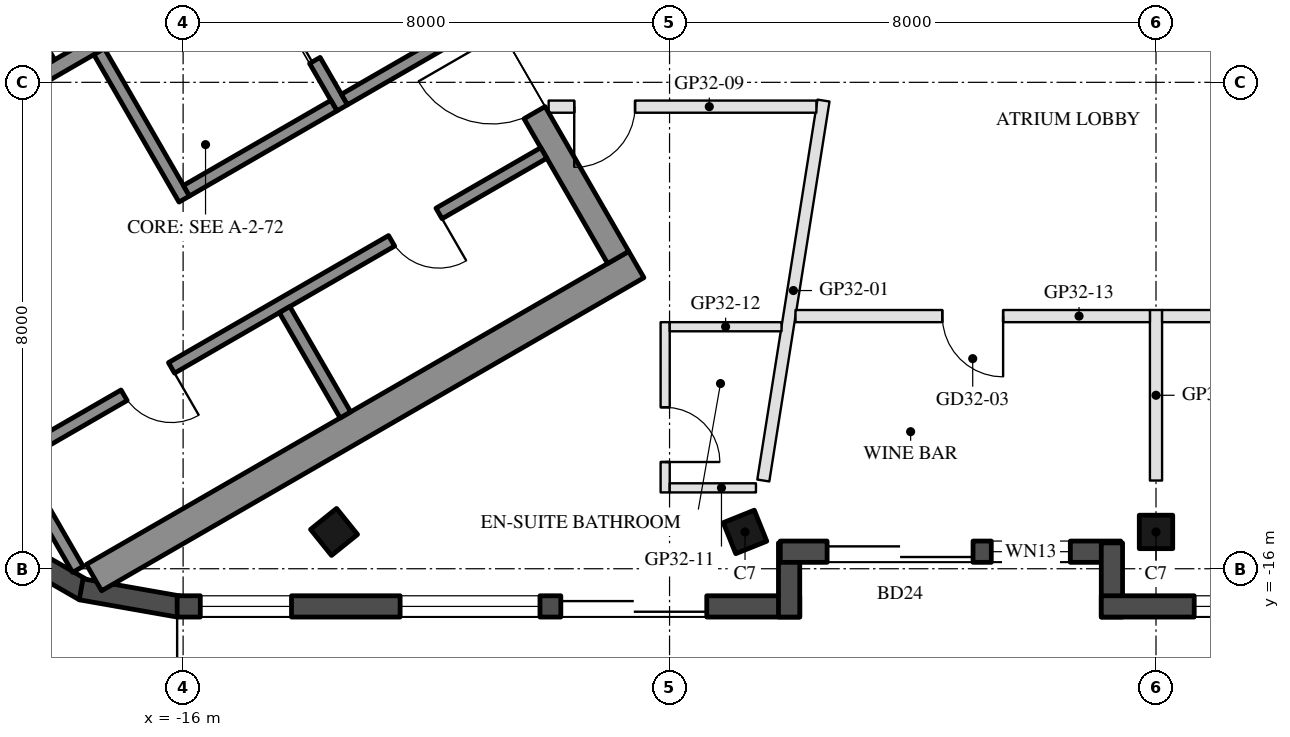
"""IFC4 building model, lengths in metres.
Left out: names, types, materials, properties, quantities, classifications, styles, units other than length and angle.
Written with IfcOpenShell. Run it as: python <this file> out.ifc"""

import sys

from ifc_helpers import new_model, si_unit, direction, frame, frame_2d, origin, origin_2d, place, context, subcontext, project, spatial, rectangle, hollow_rectangle, extrude, boolean, halfspace, element, fill, save


model = new_model("IFC4")
c1 = context("Model", 3, precision=1e-05, world=origin(), true_north=direction((0.0, 1.0)))
c2 = subcontext(c1, "Body", "Model", "MODEL_VIEW")
j1 = project(units=[si_unit("LENGTHUNIT", "METRE"), si_unit("PLANEANGLEUNIT", "RADIAN")], contexts=[c1])
p1 = place(None, origin())
s1 = spatial("IfcSite", under=j1, at=p1, CompositionType="ELEMENT")
p2 = place(p1, origin())
s2 = spatial("IfcBuilding", under=s1, at=p2, CompositionType="ELEMENT")
p3 = place(p2, frame((0.0, 0.0, 309.6)))
s3 = spatial("IfcBuildingStorey", under=s2, at=p3, CompositionType="ELEMENT", Elevation=309.6)
p4 = place(p3, frame((-13.518, -15.395, 0.0), z_axis=(0.121069901949, 0.150398600122, 0.981184151892), x_axis=(-0.992601568988, 0.00920533993, 0.121067695767)))
e1 = element("IfcColumn", 1, at=p4, inside=s3, PredefinedType="COLUMN", context=c2, shape_type="SweptSolid", body=[
    boolean("DIFFERENCE", boolean("DIFFERENCE", extrude(hollow_rectangle(XDim=0.55, YDim=0.55, WallThickness=0.025, at=origin_2d()), origin(), (0.0, 0.0, 1.0), 3.771), halfspace(frame((0.0, 0.0, 0.04), z_axis=(0.0, 0.0, 1.0), x_axis=(1.0, 0.0, 0.0)), True)), halfspace(frame((0.0, 0.0, 3.731), z_axis=(0.0, 0.0, 1.0), x_axis=(1.0, 0.0, 0.0)), False)),
])
p5 = place(p3, frame((-6.759, -15.395, 0.0), z_axis=(0.060805602285, 0.151232777417, 0.986626234075), x_axis=(-0.998137511125, 0.004342411053, 0.060849423591)))
e2 = element("IfcColumn", 2, at=p5, inside=s3, PredefinedType="COLUMN", context=c2, shape_type="SweptSolid", body=[
    boolean("DIFFERENCE", boolean("DIFFERENCE", extrude(hollow_rectangle(XDim=0.55, YDim=0.55, WallThickness=0.025, at=origin_2d()), origin(), (0.0, 0.0, 1.0), 3.75), halfspace(frame((0.0, 0.0, 0.034), z_axis=(0.0, 0.0, 1.0), x_axis=(1.0, 0.0, 0.0)), True)), halfspace(frame((0.0, 0.0, 3.716), z_axis=(0.0, 0.0, 1.0), x_axis=(1.0, 0.0, 0.0)), False)),
])
p6 = place(p3, frame((0.0, -15.395, 0.0), z_axis=(0.0, 0.151513133163, 0.98845524455), x_axis=(-1.0, 0.0, 0.0)))
e3 = element("IfcColumn", 3, at=p6, inside=s3, PredefinedType="COLUMN", context=c2, shape_type="SweptSolid", body=[
    boolean("DIFFERENCE", boolean("DIFFERENCE", extrude(hollow_rectangle(XDim=0.55, YDim=0.55, WallThickness=0.025, at=origin_2d()), origin(), (0.0, 0.0, 1.0), 3.743), halfspace(frame((0.0, 0.0, 0.031), z_axis=(0.0, 0.0, 1.0), x_axis=(1.0, 0.0, 0.0)), True)), halfspace(frame((0.0, 0.0, 3.712), z_axis=(0.0, 0.0, 1.0), x_axis=(1.0, 0.0, 0.0)), False)),
])
p7 = place(p3, frame((-19.035, -15.542, 0.0), z_axis=(0.0, 0.0, 1.0), x_axis=(0.866083589932, -0.499899205091, 0.0)))
e4 = element("IfcWall", 4, at=p7, inside=s3, PredefinedType="SOLIDWALL", context=c2, shape_type="SweptSolid", body=[
    extrude(rectangle(XDim=1.634, YDim=0.35, at=frame_2d((0.817, 0.0))), origin(), (0.0, 0.0, 1.0), 3.55),
])
p8 = place(p3, frame((-17.677, -16.338, 0.0), z_axis=(0.0, 0.0, 1.0), x_axis=(0.98479107762, -0.173742721977, 0.0)))
e5 = element("IfcWall", 5, at=p8, inside=s3, PredefinedType="SOLIDWALL", context=c2, shape_type="SweptSolid", body=[
    extrude(rectangle(XDim=1.634, YDim=0.35, at=frame_2d((0.817, 0.0))), origin(), (0.0, 0.0, 1.0), 3.55),
])
p9 = place(p3, frame((-16.098, -16.62, 0.0), z_axis=(0.0, 0.0, 1.0), x_axis=(1.0, 0.0, 0.0)))
e6 = element("IfcWall", 6, at=p9, inside=s3, PredefinedType="SOLIDWALL", context=c2, shape_type="SweptSolid", body=[
    extrude(rectangle(XDim=10.239, YDim=0.35, at=frame_2d((5.12, 0.0))), origin(), (0.0, 0.0, 1.0), 3.55),
])
p10 = place(p9, frame((0.381, 0.0, 0.3)))
e7 = element("IfcOpeningElement", 7, at=p10, cuts=e6, PredefinedType="OPENING", context=c2, shape_type="SweptSolid", body=[
    extrude(rectangle(XDim=1.5, YDim=2.65, at=frame_2d((0.75, 1.325))), frame((0.0, 0.185, 0.0), z_axis=(0.0, -1.0, 0.0), x_axis=(1.0, 0.0, 0.0)), (0.0, 0.0, 1.0), 0.37),
])
p11 = place(p9, frame((6.31, 0.0, 0.0)))
e8 = element("IfcOpeningElement", 8, at=p11, cuts=e6, PredefinedType="OPENING", context=c2, shape_type="SweptSolid", body=[
    extrude(rectangle(XDim=2.4, YDim=2.4, at=frame_2d((1.2, 1.2))), frame((0.0, 0.185, 0.0), z_axis=(0.0, -1.0, 0.0), x_axis=(1.0, 0.0, 0.0)), (0.0, 0.0, 1.0), 0.37),
])
p12 = place(p9, frame((3.667, 0.0, 0.3)))
e9 = element("IfcOpeningElement", 9, at=p12, cuts=e6, PredefinedType="OPENING", context=c2, shape_type="SweptSolid", body=[
    extrude(rectangle(XDim=2.3, YDim=2.65, at=frame_2d((1.15, 1.325))), frame((0.0, 0.185, 0.0), z_axis=(0.0, -1.0, 0.0), x_axis=(1.0, 0.0, 0.0)), (0.0, 0.0, 1.0), 0.37),
])
p13 = place(p3, frame((-6.034, -16.795, 0.0), z_axis=(0.0, 0.0, 1.0), x_axis=(0.0, 1.0, 0.0)))
e10 = element("IfcWall", 10, at=p13, inside=s3, PredefinedType="SOLIDWALL", context=c2, shape_type="SweptSolid", body=[
    extrude(rectangle(XDim=1.22, YDim=0.35, at=frame_2d((0.61, 0.0))), origin(), (0.0, 0.0, 1.0), 3.55),
])
p14 = place(p3, frame((-6.179, -15.719, 0.0), z_axis=(0.0, 0.0, 1.0), x_axis=(1.0, 0.0, 0.0)))
e11 = element("IfcWall", 11, at=p14, inside=s3, PredefinedType="SOLIDWALL", context=c2, shape_type="SweptSolid", body=[
    extrude(rectangle(XDim=5.599, YDim=0.35, at=frame_2d((2.799, 0.0))), origin(), (0.0, 0.0, 1.0), 3.55),
])
p15 = place(p14, frame((0.77, 0.0, 0.0)))
e12 = element("IfcOpeningElement", 12, at=p15, cuts=e11, PredefinedType="OPENING", context=c2, shape_type="SweptSolid", body=[
    extrude(rectangle(XDim=2.4, YDim=2.4, at=frame_2d((1.2, 1.2))), frame((0.0, 0.185, 0.0), z_axis=(0.0, -1.0, 0.0), x_axis=(1.0, 0.0, 0.0)), (0.0, 0.0, 1.0), 0.37),
])
p16 = place(p14, frame((3.47, 0.0, 0.3)))
e13 = element("IfcOpeningElement", 13, at=p16, cuts=e11, PredefinedType="OPENING", context=c2, shape_type="SweptSolid", body=[
    extrude(rectangle(XDim=1.3, YDim=2.65, at=frame_2d((0.65, 1.325))), frame((0.0, 0.185, 0.0), z_axis=(0.0, -1.0, 0.0), x_axis=(1.0, 0.0, 0.0)), (0.0, 0.0, 1.0), 0.37),
])
p17 = place(p3, frame((-0.725, -15.575, 0.0), z_axis=(0.0, 0.0, 1.0), x_axis=(0.0, -1.0, 0.0)))
e14 = element("IfcWall", 14, at=p17, inside=s3, PredefinedType="SOLIDWALL", context=c2, shape_type="SweptSolid", body=[
    extrude(rectangle(XDim=1.22, YDim=0.35, at=frame_2d((0.61, 0.0))), origin(), (0.0, 0.0, 1.0), 3.55),
])
p18 = place(p3, frame((-0.9, -16.62, 0.0), z_axis=(0.0, 0.0, 1.0), x_axis=(1.0, 0.0, 0.0)))
e15 = element("IfcWall", 15, at=p18, inside=s3, PredefinedType="SOLIDWALL", context=c2, shape_type="SweptSolid", body=[
    extrude(rectangle(XDim=8.559, YDim=0.35, at=frame_2d((4.279, 0.0))), origin(), (0.0, 0.0, 1.0), 3.55),
])
p19 = place(p18, frame((3.85, 0.0, 0.0)))
e16 = element("IfcOpeningElement", 16, at=p19, cuts=e15, PredefinedType="OPENING", context=c2, shape_type="SweptSolid", body=[
    extrude(rectangle(XDim=1.8, YDim=2.4, at=frame_2d((0.9, 1.2))), frame((0.0, 0.185, 0.0), z_axis=(0.0, -1.0, 0.0), x_axis=(1.0, 0.0, 0.0)), (0.0, 0.0, 1.0), 0.37),
])
p20 = place(p18, frame((1.528, 0.0, 0.3)))
e17 = element("IfcOpeningElement", 17, at=p20, cuts=e15, PredefinedType="OPENING", context=c2, shape_type="SweptSolid", body=[
    extrude(rectangle(XDim=2.0, YDim=2.65, at=frame_2d((1.0, 1.325))), frame((0.0, 0.185, 0.0), z_axis=(0.0, -1.0, 0.0), x_axis=(1.0, 0.0, 0.0)), (0.0, 0.0, 1.0), 0.37),
])
p21 = place(p3, frame((-8.547, -10.997, 0.0), z_axis=(0.0, 0.0, 1.0), x_axis=(-0.866027279078, -0.499996751883, 0.0)))
e18 = element("IfcWall", 18, at=p21, inside=s3, PredefinedType="SHEAR", context=c2, shape_type="SweptSolid", body=[
    extrude(rectangle(XDim=10.298, YDim=0.5, at=frame_2d((5.149, 0.0))), origin(), (0.0, 0.0, 1.0), 3.5),
])
p22 = place(p3, frame((-13.845, -2.22, 0.0), z_axis=(0.0, 0.0, 1.0), x_axis=(0.500004234368, -0.866022959057, 0.0)))
e19 = element("IfcWall", 19, at=p22, inside=s3, PredefinedType="SHEAR", context=c2, shape_type="SweptSolid", body=[
    extrude(rectangle(XDim=10.0, YDim=0.4, at=frame_2d((5.0, 0.0))), origin(), (0.0, 0.0, 1.0), 3.5),
])
p23 = place(p22, frame((3.55, 0.0, 0.0)))
e20 = element("IfcOpeningElement", 20, at=p23, cuts=e19, PredefinedType="OPENING", context=c2, shape_type="SweptSolid", body=[
    extrude(rectangle(XDim=1.1, YDim=2.1, at=frame_2d((0.55, 1.05))), frame((0.0, 0.21, 0.0), z_axis=(0.0, -1.0, 0.0), x_axis=(1.0, 0.0, 0.0)), (0.0, 0.0, 1.0), 0.42),
])
p24 = place(p22, frame((5.85, 0.0, 0.0)))
e21 = element("IfcOpeningElement", 21, at=p24, cuts=e19, PredefinedType="OPENING", context=c2, shape_type="SweptSolid", body=[
    extrude(rectangle(XDim=1.4, YDim=2.1, at=frame_2d((0.7, 1.05))), frame((0.0, 0.21, 0.0), z_axis=(0.0, -1.0, 0.0), x_axis=(1.0, 0.0, 0.0)), (0.0, 0.0, 1.0), 0.42),
])
p25 = place(p3, frame((-12.681, -4.636, 0.0), z_axis=(0.0, 0.0, 1.0), x_axis=(-0.866021702275, -0.500006411147, 0.0)))
e22 = element("IfcWall", 22, at=p25, inside=s3, PredefinedType="SHEAR", context=c2, shape_type="SweptSolid", body=[
    extrude(rectangle(XDim=6.45, YDim=0.25, at=frame_2d((3.225, 0.0))), origin(), (0.0, 0.0, 1.0), 3.5),
])
p26 = place(p25, frame((0.3, 0.0, 0.0)))
e23 = element("IfcOpeningElement", 23, at=p26, cuts=e22, PredefinedType="OPENING", context=c2, shape_type="SweptSolid", body=[
    extrude(rectangle(XDim=1.0, YDim=2.1, at=frame_2d((0.5, 1.05))), frame((0.0, 0.135, 0.0), z_axis=(0.0, -1.0, 0.0), x_axis=(1.0, 0.0, 0.0)), (0.0, 0.0, 1.0), 0.27),
])
p27 = place(p3, frame((-19.496, -5.482, 0.0), z_axis=(0.0, 0.0, 1.0), x_axis=(0.499990435942, -0.866030925526, 0.0)))
e24 = element("IfcWall", 24, at=p27, inside=s3, PredefinedType="SHEAR", context=c2, shape_type="SweptSolid", body=[
    extrude(rectangle(XDim=2.55, YDim=0.25, at=frame_2d((1.275, 0.0))), origin(), (0.0, 0.0, 1.0), 3.5),
])
p28 = place(p3, frame((-17.381, -7.495, 0.0), z_axis=(0.0, 0.0, 1.0), x_axis=(0.500011755427, -0.866018616679, 0.0)))
e25 = element("IfcWall", 25, at=p28, inside=s3, PredefinedType="SHEAR", context=c2, shape_type="SweptSolid", body=[
    extrude(rectangle(XDim=2.8, YDim=0.2, at=frame_2d((1.4, 0.0))), origin(), (0.0, 0.0, 1.0), 3.5),
])
p29 = place(p3, frame((-14.783, -5.995, 0.0), z_axis=(0.0, 0.0, 1.0), x_axis=(0.49994636267, -0.866056369097, 0.0)))
e26 = element("IfcWall", 26, at=p29, inside=s3, PredefinedType="SHEAR", context=c2, shape_type="SweptSolid", body=[
    extrude(rectangle(XDim=2.8, YDim=0.2, at=frame_2d((1.4, 0.0))), origin(), (0.0, 0.0, 1.0), 3.5),
])
p30 = place(p29, frame((0.7, 0.0, 0.0)))
e27 = element("IfcOpeningElement", 27, at=p30, cuts=e26, PredefinedType="OPENING", context=c2, shape_type="SweptSolid", body=[
    extrude(rectangle(XDim=1.2, YDim=2.1, at=frame_2d((0.6, 1.05))), frame((0.0, 0.11, 0.0), z_axis=(0.0, -1.0, 0.0), x_axis=(1.0, 0.0, 0.0)), (0.0, 0.0, 1.0), 0.22),
])
p31 = place(p3, frame((-13.52, -8.383, 0.0), z_axis=(0.0, 0.0, 1.0), x_axis=(-0.866034573852, -0.49998411664, 0.0)))
e28 = element("IfcWall", 28, at=p31, inside=s3, PredefinedType="SHEAR", context=c2, shape_type="SweptSolid", body=[
    extrude(rectangle(XDim=2.8, YDim=0.2, at=frame_2d((1.4, 0.0))), origin(), (0.0, 0.0, 1.0), 3.5),
])
p32 = place(p3, frame((-11.268, -7.083, 0.0), z_axis=(0.0, 0.0, 1.0), x_axis=(-0.866050077142, -0.499957262057, 0.0)))
e29 = element("IfcWall", 29, at=p32, inside=s3, PredefinedType="SHEAR", context=c2, shape_type="SweptSolid", body=[
    extrude(rectangle(XDim=2.4, YDim=0.2, at=frame_2d((1.2, 0.0))), origin(), (0.0, 0.0, 1.0), 3.5),
])
p33 = place(p3, frame((-10.068, -9.162, 0.0), z_axis=(0.0, 0.0, 1.0), x_axis=(-0.866032725843, -0.499987317609, 0.0)))
e30 = element("IfcWall", 30, at=p33, inside=s3, PredefinedType="SHEAR", context=c2, shape_type="SweptSolid", body=[
    extrude(rectangle(XDim=10.16, YDim=0.2, at=frame_2d((5.08, 0.0))), origin(), (0.0, 0.0, 1.0), 3.5),
])
p34 = place(p33, frame((1.99, 0.0, 0.0)))
e31 = element("IfcOpeningElement", 31, at=p34, cuts=e30, PredefinedType="OPENING", context=c2, shape_type="SweptSolid", body=[
    extrude(rectangle(XDim=0.9, YDim=2.1, at=frame_2d((0.45, 1.05))), frame((0.0, 0.11, 0.0), z_axis=(0.0, -1.0, 0.0), x_axis=(1.0, 0.0, 0.0)), (0.0, 0.0, 1.0), 0.22),
])
p35 = place(p33, frame((7.07, 0.0, 0.0)))
e32 = element("IfcOpeningElement", 32, at=p35, cuts=e30, PredefinedType="OPENING", context=c2, shape_type="SweptSolid", body=[
    extrude(rectangle(XDim=0.9, YDim=2.1, at=frame_2d((0.45, 1.05))), frame((0.0, 0.11, 0.0), z_axis=(0.0, -1.0, 0.0), x_axis=(1.0, 0.0, 0.0)), (0.0, 0.0, 1.0), 0.22),
])
for number, where, z_axis, x_axis in (
    (33, (-14.331, -11.738, 0.0), (0.0, 0.0, 1.0), (0.5, -0.866, 0.0)),
    (34, (-18.73, -14.278, 0.0), (0.0, 0.0, 1.0), (0.5, -0.866, 0.0)),
):
    element("IfcWall", number, at=place(p3, frame(where, z_axis=z_axis, x_axis=x_axis)), inside=s3, PredefinedType="SHEAR", context=c2, shape_type="SweptSolid", body=[
        extrude(rectangle(XDim=2.0, YDim=0.2, at=frame_2d((1.0, 0.0))), origin(), (0.0, 0.0, 1.0), 3.5),
    ])
p36 = place(p3, frame((-6.458, -14.549, 0.0), z_axis=(0.0, 0.0, 1.0), x_axis=(0.156515409126, 0.987675516911, 0.0)))
e35 = element("IfcWall", 35, at=p36, inside=s3, PredefinedType="PARTITIONING", context=c2, shape_type="SweptSolid", body=[
    extrude(rectangle(XDim=6.327, YDim=0.2, at=frame_2d((3.163, 0.0))), origin(), (0.0, 0.0, 1.0), 3.1),
])
p37 = place(p3, frame((0.0, -14.549, 0.0), z_axis=(0.0, 0.0, 1.0), x_axis=(0.0, 1.0, 0.0)))
e36 = element("IfcWall", 36, at=p37, inside=s3, PredefinedType="PARTITIONING", context=c2, shape_type="SweptSolid", body=[
    extrude(rectangle(XDim=2.805, YDim=0.2, at=frame_2d((1.402, 0.0))), origin(), (0.0, 0.0, 1.0), 3.1),
])
p38 = place(p3, frame((-5.585, -8.4, 0.0), z_axis=(0.0, 0.0, 1.0), x_axis=(-1.0, 0.0, 0.0)))
e37 = element("IfcWall", 37, at=p38, inside=s3, PredefinedType="PARTITIONING", context=c2, shape_type="SweptSolid", body=[
    extrude(rectangle(XDim=4.403, YDim=0.2, at=frame_2d((2.201, 0.0))), origin(), (0.0, 0.0, 1.0), 3.1),
])
p39 = place(p38, frame((2.982, 0.0, 0.0)))
e38 = element("IfcOpeningElement", 38, at=p39, cuts=e37, PredefinedType="OPENING", context=c2, shape_type="SweptSolid", body=[
    extrude(rectangle(XDim=1.0, YDim=2.1, at=frame_2d((0.5, 1.05))), frame((0.0, 0.11, 0.0), z_axis=(0.0, -1.0, 0.0), x_axis=(1.0, 0.0, 0.0)), (0.0, 0.0, 1.0), 0.22),
])
p40 = place(p3, frame((-8.072, -11.945, 0.0), z_axis=(0.0, 0.0, 1.0), x_axis=(0.0, -1.0, 0.0)))
e39 = element("IfcWall", 39, at=p40, inside=s3, PredefinedType="PARTITIONING", context=c2, shape_type="SweptSolid", body=[
    extrude(rectangle(XDim=2.8, YDim=0.15, at=frame_2d((1.4, 0.0))), origin(), (0.0, 0.0, 1.0), 3.1),
])
p41 = place(p40, frame((1.4, 0.0, 0.0)))
e40 = element("IfcOpeningElement", 40, at=p41, cuts=e39, PredefinedType="OPENING", context=c2, shape_type="SweptSolid", body=[
    extrude(rectangle(XDim=0.9, YDim=2.1, at=frame_2d((0.45, 1.05))), frame((0.0, 0.085, 0.0), z_axis=(0.0, -1.0, 0.0), x_axis=(1.0, 0.0, 0.0)), (0.0, 0.0, 1.0), 0.17),
])
p42 = place(p3, frame((-7.997, -14.67, 0.0), z_axis=(0.0, 0.0, 1.0), x_axis=(1.0, 0.0, 0.0)))
e41 = element("IfcWall", 41, at=p42, inside=s3, PredefinedType="PARTITIONING", context=c2, shape_type="SweptSolid", body=[
    extrude(rectangle(XDim=1.418, YDim=0.15, at=frame_2d((0.709, 0.0))), origin(), (0.0, 0.0, 1.0), 3.1),
])
p43 = place(p3, frame((-7.997, -12.02, 0.0), z_axis=(0.0, 0.0, 1.0), x_axis=(1.0, 0.0, 0.0)))
e42 = element("IfcWall", 42, at=p43, inside=s3, PredefinedType="PARTITIONING", context=c2, shape_type="SweptSolid", body=[
    extrude(rectangle(XDim=1.838, YDim=0.15, at=frame_2d((0.919, 0.0))), origin(), (0.0, 0.0, 1.0), 3.1),
])
p44 = place(p3, frame((-0.1, -11.844, 0.0), z_axis=(0.0, 0.0, 1.0), x_axis=(-1.0, 0.0, 0.0)))
e43 = element("IfcWall", 43, at=p44, inside=s3, PredefinedType="PARTITIONING", context=c2, shape_type="SweptSolid", body=[
    extrude(rectangle(XDim=5.829, YDim=0.2, at=frame_2d((2.914, 0.0))), origin(), (0.0, 0.0, 1.0), 3.1),
])
p45 = place(p44, frame((2.414, 0.0, 0.0)))
e44 = element("IfcOpeningElement", 44, at=p45, cuts=e43, PredefinedType="OPENING", context=c2, shape_type="SweptSolid", body=[
    extrude(rectangle(XDim=1.0, YDim=2.1, at=frame_2d((0.5, 1.05))), frame((0.0, 0.11, 0.0), z_axis=(0.0, -1.0, 0.0), x_axis=(1.0, 0.0, 0.0)), (0.0, 0.0, 1.0), 0.22),
])
p46 = place(p3, frame((5.1, -11.844, 0.0), z_axis=(0.0, 0.0, 1.0), x_axis=(-1.0, 0.0, 0.0)))
e45 = element("IfcWall", 45, at=p46, inside=s3, PredefinedType="PARTITIONING", context=c2, shape_type="SweptSolid", body=[
    extrude(rectangle(XDim=5.0, YDim=0.2, at=frame_2d((2.5, 0.0))), origin(), (0.0, 0.0, 1.0), 3.1),
])
p47 = place(p46, frame((2.0, 0.0, 0.0)))
e46 = element("IfcOpeningElement", 46, at=p47, cuts=e45, PredefinedType="OPENING", context=c2, shape_type="SweptSolid", body=[
    extrude(rectangle(XDim=1.0, YDim=2.1, at=frame_2d((0.5, 1.05))), frame((0.0, 0.11, 0.0), z_axis=(0.0, -1.0, 0.0), x_axis=(1.0, 0.0, 0.0)), (0.0, 0.0, 1.0), 0.22),
])
p48 = place(p10, origin())
e47 = element("IfcWindow", 47, at=p48, inside=s3, PartitioningType="SINGLE_PANEL", PredefinedType="WINDOW", context=c2, shape_type="SweptSolid", body=[
    extrude(rectangle(XDim=1.5, YDim=2.65, at=frame_2d((0.75, 1.325))), frame((0.0, 0.03, 0.0), z_axis=(0.0, -1.0, 0.0), x_axis=(1.0, 0.0, 0.0)), (0.0, 0.0, 1.0), 0.06),
])
fill(e7, e47)
p49 = place(p11, frame((2.4, 0.0, 0.0), z_axis=(0.0, 0.0, 1.0), x_axis=(-1.0, 0.0, 0.0)))
e48 = element("IfcDoor", 48, at=p49, inside=s3, OperationType="SLIDING_TO_LEFT", PredefinedType="DOOR", context=c2, shape_type="SweptSolid", body=[
    extrude(rectangle(XDim=2.4, YDim=2.4, at=frame_2d((1.2, 1.2))), frame((0.0, 0.025, 0.0), z_axis=(0.0, -1.0, 0.0), x_axis=(1.0, 0.0, 0.0)), (0.0, 0.0, 1.0), 0.05),
])
fill(e8, e48)
p50 = place(p12, origin())
e49 = element("IfcWindow", 49, at=p50, inside=s3, PartitioningType="SINGLE_PANEL", PredefinedType="WINDOW", context=c2, shape_type="SweptSolid", body=[
    extrude(rectangle(XDim=2.3, YDim=2.65, at=frame_2d((1.15, 1.325))), frame((0.0, 0.03, 0.0), z_axis=(0.0, -1.0, 0.0), x_axis=(1.0, 0.0, 0.0)), (0.0, 0.0, 1.0), 0.06),
])
fill(e9, e49)
p51 = place(p15, frame((2.4, 0.0, 0.0), z_axis=(0.0, 0.0, 1.0), x_axis=(-1.0, 0.0, 0.0)))
e50 = element("IfcDoor", 50, at=p51, inside=s3, OperationType="SLIDING_TO_LEFT", PredefinedType="DOOR", context=c2, shape_type="SweptSolid", body=[
    extrude(rectangle(XDim=2.4, YDim=2.4, at=frame_2d((1.2, 1.2))), frame((0.0, 0.025, 0.0), z_axis=(0.0, -1.0, 0.0), x_axis=(1.0, 0.0, 0.0)), (0.0, 0.0, 1.0), 0.05),
])
fill(e12, e50)
p52 = place(p16, origin())
e51 = element("IfcWindow", 51, at=p52, inside=s3, PartitioningType="SINGLE_PANEL", PredefinedType="WINDOW", context=c2, shape_type="SweptSolid", body=[
    extrude(rectangle(XDim=1.3, YDim=2.65, at=frame_2d((0.65, 1.325))), frame((0.0, 0.03, 0.0), z_axis=(0.0, -1.0, 0.0), x_axis=(1.0, 0.0, 0.0)), (0.0, 0.0, 1.0), 0.06),
])
fill(e13, e51)
p53 = place(p20, origin())
e52 = element("IfcWindow", 52, at=p53, inside=s3, PartitioningType="SINGLE_PANEL", PredefinedType="WINDOW", context=c2, shape_type="SweptSolid", body=[
    extrude(rectangle(XDim=2.0, YDim=2.65, at=frame_2d((1.0, 1.325))), frame((0.0, 0.03, 0.0), z_axis=(0.0, -1.0, 0.0), x_axis=(1.0, 0.0, 0.0)), (0.0, 0.0, 1.0), 0.06),
])
fill(e17, e52)
p54 = place(p30, origin())
e53 = element("IfcDoor", 53, at=p54, inside=s3, OperationType="DOUBLE_DOOR_SLIDING", PredefinedType="DOOR", context=c2, shape_type="SweptSolid", body=[
    extrude(rectangle(XDim=1.2, YDim=2.1, at=frame_2d((0.6, 1.05))), frame((0.0, 0.025, 0.0), z_axis=(0.0, -1.0, 0.0), x_axis=(1.0, 0.0, 0.0)), (0.0, 0.0, 1.0), 0.05),
])
fill(e27, e53)
p55 = place(p34, origin())
e54 = element("IfcDoor", 54, at=p55, inside=s3, OperationType="SINGLE_SWING_LEFT", PredefinedType="DOOR", context=c2, shape_type="SweptSolid", body=[
    extrude(rectangle(XDim=0.9, YDim=2.1, at=frame_2d((0.45, 1.05))), frame((0.0, 0.025, 0.0), z_axis=(0.0, -1.0, 0.0), x_axis=(1.0, 0.0, 0.0)), (0.0, 0.0, 1.0), 0.05),
])
fill(e31, e54)
p56 = place(p35, origin())
e55 = element("IfcDoor", 55, at=p56, inside=s3, OperationType="SINGLE_SWING_LEFT", PredefinedType="DOOR", context=c2, shape_type="SweptSolid", body=[
    extrude(rectangle(XDim=0.9, YDim=2.1, at=frame_2d((0.45, 1.05))), frame((0.0, 0.025, 0.0), z_axis=(0.0, -1.0, 0.0), x_axis=(1.0, 0.0, 0.0)), (0.0, 0.0, 1.0), 0.05),
])
fill(e32, e55)
p57 = place(p24, frame((1.4, 0.0, 0.0), z_axis=(0.0, 0.0, 1.0), x_axis=(-1.0, 0.0, 0.0)))
e56 = element("IfcDoor", 56, at=p57, inside=s3, OperationType="DOUBLE_DOOR_SINGLE_SWING", PredefinedType="DOOR", context=c2, shape_type="SweptSolid", body=[
    extrude(rectangle(XDim=1.4, YDim=2.1, at=frame_2d((0.7, 1.05))), frame((0.0, 0.025, 0.0), z_axis=(0.0, -1.0, 0.0), x_axis=(1.0, 0.0, 0.0)), (0.0, 0.0, 1.0), 0.05),
])
fill(e21, e56)
p58 = place(p41, origin())
e57 = element("IfcDoor", 57, at=p58, inside=s3, OperationType="SINGLE_SWING_RIGHT", PredefinedType="DOOR", context=c2, shape_type="SweptSolid", body=[
    extrude(rectangle(XDim=0.9, YDim=2.1, at=frame_2d((0.45, 1.05))), frame((0.0, 0.025, 0.0), z_axis=(0.0, -1.0, 0.0), x_axis=(1.0, 0.0, 0.0)), (0.0, 0.0, 1.0), 0.05),
])
fill(e40, e57)
p59 = place(p39, origin())
e58 = element("IfcDoor", 58, at=p59, inside=s3, OperationType="SINGLE_SWING_RIGHT", PredefinedType="DOOR", context=c2, shape_type="SweptSolid", body=[
    extrude(rectangle(XDim=1.0, YDim=2.1, at=frame_2d((0.5, 1.05))), frame((0.0, 0.025, 0.0), z_axis=(0.0, -1.0, 0.0), x_axis=(1.0, 0.0, 0.0)), (0.0, 0.0, 1.0), 0.05),
])
fill(e38, e58)
p60 = place(p45, origin())
e59 = element("IfcDoor", 59, at=p60, inside=s3, OperationType="SINGLE_SWING_LEFT", PredefinedType="DOOR", context=c2, shape_type="SweptSolid", body=[
    extrude(rectangle(XDim=1.0, YDim=2.1, at=frame_2d((0.5, 1.05))), frame((0.0, 0.025, 0.0), z_axis=(0.0, -1.0, 0.0), x_axis=(1.0, 0.0, 0.0)), (0.0, 0.0, 1.0), 0.05),
])
fill(e44, e59)
save(model, sys.argv[1])
